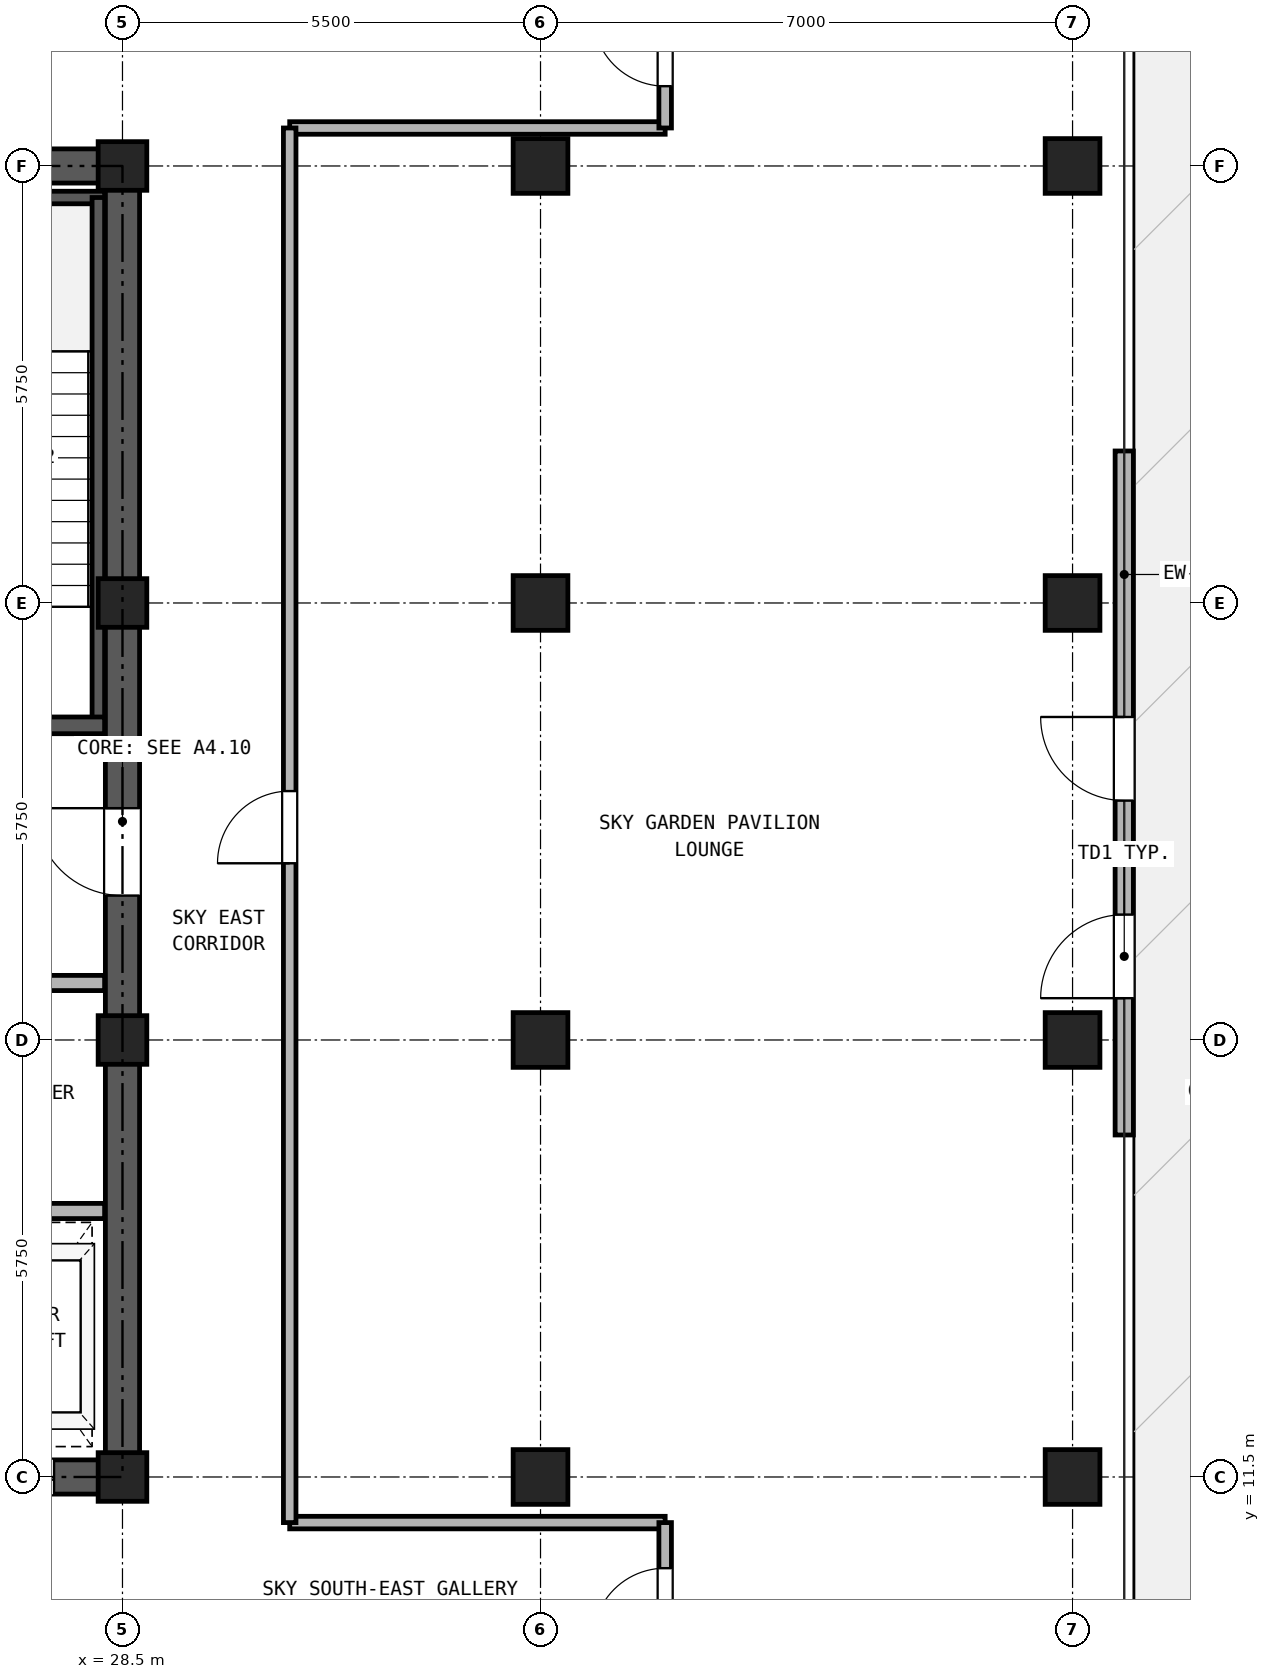
"""IFC4 building model, lengths in metres.
Left out: names, types, materials, properties, quantities, classifications, styles, units other than length and angle.
Written with IfcOpenShell. Run it as: python <this file> out.ifc"""

import sys

from ifc_helpers import new_model, si_unit, direction, frame, frame_2d, origin, origin_2d, place, context, subcontext, project, spatial, rectangle, hollow_rectangle, extrude, source, transform, mapped, element, fill, save


model = new_model("IFC4")
c1 = context("Model", 3, precision=1e-05, world=origin(), true_north=direction((0.0, 1.0)))
c2 = subcontext(c1, "Body", "Model", "MODEL_VIEW")
j1 = project(units=[si_unit("LENGTHUNIT", "METRE"), si_unit("PLANEANGLEUNIT", "RADIAN")], contexts=[c1])
p1 = place(None, origin())
s1 = spatial("IfcSite", under=j1, at=p1, CompositionType="ELEMENT")
p2 = place(p1, origin())
s2 = spatial("IfcBuilding", under=s1, at=p2, CompositionType="ELEMENT")
p3 = place(p2, frame((0.0, 0.0, 151.6)))
s3 = spatial("IfcBuildingStorey", under=s2, at=p3, CompositionType="ELEMENT", Elevation=151.6)
m1 = source(origin(), c2, "Body", "SweptSolid", [
    extrude(hollow_rectangle(XDim=0.72, YDim=0.72, WallThickness=0.04, at=origin_2d()), origin(), (0.0, 0.0, 1.0), 4.25),
])
for number, where, z_axis, x_axis in (
    (1, (41.0, 11.5, 0.0), (0.0, 0.0, 1.0), (1.0, 0.0, 0.0)),
    (2, (41.0, 17.25, 0.0), (0.0, 0.0, 1.0), (1.0, 0.0, 0.0)),
    (3, (41.0, 23.0, 0.0), (0.0, 0.0, 1.0), (1.0, 0.0, 0.0)),
    (4, (41.0, 28.75, 0.0), (0.0, 0.0, 1.0), (1.0, 0.0, 0.0)),
):
    element("IfcColumn", number, at=place(p3, frame(where, z_axis=z_axis, x_axis=x_axis)), inside=s3, PredefinedType="COLUMN", context=c2, shape_type="MappedRepresentation", body=[
        mapped(m1, transform((0.0, 0.0, 0.0), x_axis=(1.0, 0.0, 0.0), y_axis=(0.0, 1.0, 0.0), z_axis=(0.0, 0.0, 1.0), scale=1.0)),
    ])
m2 = source(origin(), c2, "Body", "SweptSolid", [
    extrude(hollow_rectangle(XDim=0.64, YDim=0.64, WallThickness=0.035, at=origin_2d()), origin(), (0.0, 0.0, 1.0), 4.25),
])
for number, where, z_axis, x_axis in (
    (5, (28.5, 11.5, 0.0), (0.0, 0.0, 1.0), (1.0, 0.0, 0.0)),
    (6, (28.5, 17.25, 0.0), (0.0, 0.0, 1.0), (1.0, 0.0, 0.0)),
    (7, (28.5, 23.0, 0.0), (0.0, 0.0, 1.0), (1.0, 0.0, 0.0)),
    (8, (28.5, 28.75, 0.0), (0.0, 0.0, 1.0), (1.0, 0.0, 0.0)),
):
    element("IfcColumn", number, at=place(p3, frame(where, z_axis=z_axis, x_axis=x_axis)), inside=s3, PredefinedType="COLUMN", context=c2, shape_type="MappedRepresentation", body=[
        mapped(m2, transform((0.0, 0.0, 0.0), x_axis=(1.0, 0.0, 0.0), y_axis=(0.0, 1.0, 0.0), z_axis=(0.0, 0.0, 1.0), scale=1.0)),
    ])
for number, where, z_axis, x_axis in (
    (9, (34.0, 11.5, 0.0), (0.0, 0.0, 1.0), (1.0, 0.0, 0.0)),
    (10, (34.0, 17.25, 0.0), (0.0, 0.0, 1.0), (1.0, 0.0, 0.0)),
    (11, (34.0, 23.0, 0.0), (0.0, 0.0, 1.0), (1.0, 0.0, 0.0)),
    (12, (34.0, 28.75, 0.0), (0.0, 0.0, 1.0), (1.0, 0.0, 0.0)),
):
    element("IfcColumn", number, at=place(p3, frame(where, z_axis=z_axis, x_axis=x_axis)), inside=s3, PredefinedType="COLUMN", context=c2, shape_type="MappedRepresentation", body=[
        mapped(m1, transform((0.0, 0.0, 0.0), x_axis=(1.0, 0.0, 0.0), y_axis=(0.0, 1.0, 0.0), z_axis=(0.0, 0.0, 1.0), scale=1.0)),
    ])
p4 = place(p3, frame((41.68, 16.0, 0.0), z_axis=(0.0, 0.0, 1.0), x_axis=(0.0, 1.0, 0.0)))
e13 = element("IfcWall", 13, at=p4, inside=s3, PredefinedType="SOLIDWALL", context=c2, shape_type="SweptSolid", body=[
    extrude(rectangle(XDim=9.0, YDim=0.24, at=frame_2d((4.5, 0.0))), origin(), (0.0, 0.0, 1.0), 4.25),
])
p5 = place(p4, frame((1.8, 0.0, 0.0)))
e14 = element("IfcOpeningElement", 14, at=p5, cuts=e13, PredefinedType="OPENING", context=c2, shape_type="SweptSolid", body=[
    extrude(rectangle(XDim=1.1, YDim=2.2, at=frame_2d((0.55, 1.1))), frame((0.0, 0.13, 0.0), z_axis=(0.0, -1.0, 0.0), x_axis=(1.0, 0.0, 0.0)), (0.0, 0.0, 1.0), 0.26),
])
p6 = place(p4, frame((4.4, 0.0, 0.0)))
e15 = element("IfcOpeningElement", 15, at=p6, cuts=e13, PredefinedType="OPENING", context=c2, shape_type="SweptSolid", body=[
    extrude(rectangle(XDim=1.1, YDim=2.2, at=frame_2d((0.55, 1.1))), frame((0.0, 0.13, 0.0), z_axis=(0.0, -1.0, 0.0), x_axis=(1.0, 0.0, 0.0)), (0.0, 0.0, 1.0), 0.26),
])
p7 = place(p3, frame((18.275, 11.5, 0.0), z_axis=(0.0, 0.0, 1.0), x_axis=(1.0, 0.0, 0.0)))
e16 = element("IfcWall", 16, at=p7, inside=s3, PredefinedType="SHEAR", context=c2, shape_type="SweptSolid", body=[
    extrude(rectangle(XDim=10.45, YDim=0.45, at=frame_2d((5.225, 0.0))), origin(), (0.0, 0.0, 1.0), 4.25),
])
p8 = place(p7, frame((2.325, 0.0, 0.0)))
e17 = element("IfcOpeningElement", 17, at=p8, cuts=e16, PredefinedType="OPENING", context=c2, shape_type="SweptSolid", body=[
    extrude(rectangle(XDim=0.95, YDim=2.15, at=frame_2d((0.475, 1.075))), frame((0.0, 0.235, 0.0), z_axis=(0.0, -1.0, 0.0), x_axis=(1.0, 0.0, 0.0)), (0.0, 0.0, 1.0), 0.47),
])
p9 = place(p7, frame((5.825, 0.0, 0.0)))
e18 = element("IfcOpeningElement", 18, at=p9, cuts=e16, PredefinedType="OPENING", context=c2, shape_type="SweptSolid", body=[
    extrude(rectangle(XDim=1.1, YDim=2.25, at=frame_2d((0.55, 1.125))), frame((0.0, 0.235, 0.0), z_axis=(0.0, -1.0, 0.0), x_axis=(1.0, 0.0, 0.0)), (0.0, 0.0, 1.0), 0.47),
])
p10 = place(p7, frame((8.225, 0.0, 0.0)))
e19 = element("IfcOpeningElement", 19, at=p10, cuts=e16, PredefinedType="OPENING", context=c2, shape_type="SweptSolid", body=[
    extrude(rectangle(XDim=1.1, YDim=2.25, at=frame_2d((0.55, 1.125))), frame((0.0, 0.235, 0.0), z_axis=(0.0, -1.0, 0.0), x_axis=(1.0, 0.0, 0.0)), (0.0, 0.0, 1.0), 0.47),
])
p11 = place(p3, frame((18.275, 28.75, 0.0), z_axis=(0.0, 0.0, 1.0), x_axis=(1.0, 0.0, 0.0)))
e20 = element("IfcWall", 20, at=p11, inside=s3, PredefinedType="SHEAR", context=c2, shape_type="SweptSolid", body=[
    extrude(rectangle(XDim=10.45, YDim=0.45, at=frame_2d((5.225, 0.0))), origin(), (0.0, 0.0, 1.0), 4.25),
])
p12 = place(p11, frame((4.105, 0.0, 0.0)))
e21 = element("IfcOpeningElement", 21, at=p12, cuts=e20, PredefinedType="OPENING", context=c2, shape_type="SweptSolid", body=[
    extrude(rectangle(XDim=0.9, YDim=2.05, at=frame_2d((0.45, 1.025))), frame((0.0, 0.235, 0.0), z_axis=(0.0, -1.0, 0.0), x_axis=(1.0, 0.0, 0.0)), (0.0, 0.0, 1.0), 0.47),
])
p13 = place(p11, frame((5.645, 0.0, 0.0)))
e22 = element("IfcOpeningElement", 22, at=p13, cuts=e20, PredefinedType="OPENING", context=c2, shape_type="SweptSolid", body=[
    extrude(rectangle(XDim=0.9, YDim=2.05, at=frame_2d((0.45, 1.025))), frame((0.0, 0.235, 0.0), z_axis=(0.0, -1.0, 0.0), x_axis=(1.0, 0.0, 0.0)), (0.0, 0.0, 1.0), 0.47),
])
p14 = place(p3, frame((28.5, 11.725, 0.0), z_axis=(0.0, 0.0, 1.0), x_axis=(0.0, 1.0, 0.0)))
e23 = element("IfcWall", 23, at=p14, inside=s3, PredefinedType="SHEAR", context=c2, shape_type="SweptSolid", body=[
    extrude(rectangle(XDim=16.8, YDim=0.45, at=frame_2d((8.4, 0.0))), origin(), (0.0, 0.0, 1.0), 4.25),
])
p15 = place(p14, frame((7.425, 0.0, 0.0)))
e24 = element("IfcOpeningElement", 24, at=p15, cuts=e23, PredefinedType="OPENING", context=c2, shape_type="SweptSolid", body=[
    extrude(rectangle(XDim=1.15, YDim=2.2, at=frame_2d((0.575, 1.1))), frame((0.0, 0.235, 0.0), z_axis=(0.0, -1.0, 0.0), x_axis=(1.0, 0.0, 0.0)), (0.0, 0.0, 1.0), 0.47),
])
p16 = place(p3, frame((25.13, 28.335, 0.0), z_axis=(0.0, 0.0, 1.0), x_axis=(1.0, 0.0, 0.0)))
e25 = element("IfcWall", 25, at=p16, inside=s3, PredefinedType="PARTITIONING", context=c2, shape_type="SweptSolid", body=[
    extrude(rectangle(XDim=3.135, YDim=0.165, at=frame_2d((1.567, 0.0))), origin(), (0.0, 0.0, 1.0), 4.25),
])
p17 = place(p3, frame((28.183, 21.39, 0.0), z_axis=(0.0, 0.0, 1.0), x_axis=(0.0, 1.0, 0.0)))
e26 = element("IfcWall", 26, at=p17, inside=s3, PredefinedType="PARTITIONING", context=c2, shape_type="SweptSolid", body=[
    extrude(rectangle(XDim=6.945, YDim=0.165, at=frame_2d((3.473, 0.0))), origin(), (0.0, 0.0, 1.0), 4.25),
])
p18 = place(p3, frame((25.13, 21.39, 0.0), z_axis=(0.0, 0.0, 1.0), x_axis=(1.0, 0.0, 0.0)))
e27 = element("IfcWall", 27, at=p18, inside=s3, PredefinedType="SOLIDWALL", context=c2, shape_type="SweptSolid", body=[
    extrude(rectangle(XDim=3.135, YDim=0.22, at=frame_2d((1.567, 0.0))), origin(), (0.0, 0.0, 1.0), 4.25),
])
p19 = place(p18, frame((0.92, 0.0, 0.0)))
e28 = element("IfcOpeningElement", 28, at=p19, cuts=e27, PredefinedType="OPENING", context=c2, shape_type="SweptSolid", body=[
    extrude(rectangle(XDim=1.15, YDim=2.2, at=frame_2d((0.575, 1.1))), frame((0.0, 0.12, 0.0), z_axis=(0.0, -1.0, 0.0), x_axis=(1.0, 0.0, 0.0)), (0.0, 0.0, 1.0), 0.24),
])
p20 = place(p3, frame((18.735, 18.0, 0.0), z_axis=(0.0, 0.0, 1.0), x_axis=(1.0, 0.0, 0.0)))
e29 = element("IfcWall", 29, at=p20, inside=s3, PredefinedType="PARTITIONING", context=c2, shape_type="SweptSolid", body=[
    extrude(rectangle(XDim=9.53, YDim=0.2, at=frame_2d((4.765, 0.0))), origin(), (0.0, 0.0, 1.0), 4.25),
])
p21 = place(p20, frame((0.515, 0.0, 0.0)))
e30 = element("IfcOpeningElement", 30, at=p21, cuts=e29, PredefinedType="OPENING", context=c2, shape_type="SweptSolid", body=[
    extrude(rectangle(XDim=1.3, YDim=2.3, at=frame_2d((0.65, 1.15))), frame((0.0, 0.11, 0.0), z_axis=(0.0, -1.0, 0.0), x_axis=(1.0, 0.0, 0.0)), (0.0, 0.0, 1.0), 0.22),
])
p22 = place(p20, frame((2.615, 0.0, 0.0)))
e31 = element("IfcOpeningElement", 31, at=p22, cuts=e29, PredefinedType="OPENING", context=c2, shape_type="SweptSolid", body=[
    extrude(rectangle(XDim=1.3, YDim=2.3, at=frame_2d((0.65, 1.15))), frame((0.0, 0.11, 0.0), z_axis=(0.0, -1.0, 0.0), x_axis=(1.0, 0.0, 0.0)), (0.0, 0.0, 1.0), 0.22),
])
p23 = place(p20, frame((5.015, 0.0, 0.0)))
e32 = element("IfcOpeningElement", 32, at=p23, cuts=e29, PredefinedType="OPENING", context=c2, shape_type="SweptSolid", body=[
    extrude(rectangle(XDim=0.9, YDim=2.05, at=frame_2d((0.45, 1.025))), frame((0.0, 0.11, 0.0), z_axis=(0.0, -1.0, 0.0), x_axis=(1.0, 0.0, 0.0)), (0.0, 0.0, 1.0), 0.22),
])
p24 = place(p20, frame((7.715, 0.0, 0.0)))
e33 = element("IfcOpeningElement", 33, at=p24, cuts=e29, PredefinedType="OPENING", context=c2, shape_type="SweptSolid", body=[
    extrude(rectangle(XDim=0.9, YDim=2.05, at=frame_2d((0.45, 1.025))), frame((0.0, 0.11, 0.0), z_axis=(0.0, -1.0, 0.0), x_axis=(1.0, 0.0, 0.0)), (0.0, 0.0, 1.0), 0.22),
])
p25 = place(p3, frame((18.735, 15.0, 0.0), z_axis=(0.0, 0.0, 1.0), x_axis=(1.0, 0.0, 0.0)))
e34 = element("IfcWall", 34, at=p25, inside=s3, PredefinedType="PARTITIONING", context=c2, shape_type="SweptSolid", body=[
    extrude(rectangle(XDim=9.53, YDim=0.2, at=frame_2d((4.765, 0.0))), origin(), (0.0, 0.0, 1.0), 4.25),
])
for number, where, z_axis, x_axis in (
    (35, (30.7, 10.9, 0.0), (0.0, 0.0, 1.0), (1.0, 0.0, 0.0)),
    (36, (30.7, 29.25, 0.0), (0.0, 0.0, 1.0), (1.0, 0.0, 0.0)),
):
    element("IfcWall", number, at=place(p3, frame(where, z_axis=z_axis, x_axis=x_axis)), inside=s3, PredefinedType="PARTITIONING", context=c2, shape_type="SweptSolid", body=[
        extrude(rectangle(XDim=4.94, YDim=0.165, at=frame_2d((2.47, 0.0))), origin(), (0.0, 0.0, 1.0), 4.25),
    ])
p26 = place(p3, frame((30.7, 10.9, 0.0), z_axis=(0.0, 0.0, 1.0), x_axis=(0.0, 1.0, 0.0)))
e37 = element("IfcWall", 37, at=p26, inside=s3, PredefinedType="PARTITIONING", context=c2, shape_type="SweptSolid", body=[
    extrude(rectangle(XDim=18.35, YDim=0.165, at=frame_2d((9.175, 0.0))), origin(), (0.0, 0.0, 1.0), 4.25),
])
p27 = place(p26, frame((8.675, 0.0, 0.0)))
e38 = element("IfcOpeningElement", 38, at=p27, cuts=e37, PredefinedType="OPENING", context=c2, shape_type="SweptSolid", body=[
    extrude(rectangle(XDim=0.95, YDim=2.15, at=frame_2d((0.475, 1.075))), frame((0.0, 0.093, 0.0), z_axis=(0.0, -1.0, 0.0), x_axis=(1.0, 0.0, 0.0)), (0.0, 0.0, 1.0), 0.185),
])
p28 = place(p3, frame((35.64, 0.16, 0.0), z_axis=(0.0, 0.0, 1.0), x_axis=(0.0, 1.0, 0.0)))
e39 = element("IfcWall", 39, at=p28, inside=s3, PredefinedType="PARTITIONING", context=c2, shape_type="SweptSolid", body=[
    extrude(rectangle(XDim=10.74, YDim=0.165, at=frame_2d((5.37, 0.0))), origin(), (0.0, 0.0, 1.0), 4.25),
])
p29 = place(p28, frame((9.19, 0.0, 0.0)))
e40 = element("IfcOpeningElement", 40, at=p29, cuts=e39, PredefinedType="OPENING", context=c2, shape_type="SweptSolid", body=[
    extrude(rectangle(XDim=0.95, YDim=2.15, at=frame_2d((0.475, 1.075))), frame((0.0, 0.093, 0.0), z_axis=(0.0, -1.0, 0.0), x_axis=(1.0, 0.0, 0.0)), (0.0, 0.0, 1.0), 0.185),
])
p30 = place(p3, frame((35.64, 29.25, 0.0), z_axis=(0.0, 0.0, 1.0), x_axis=(0.0, 1.0, 0.0)))
e41 = element("IfcWall", 41, at=p30, inside=s3, PredefinedType="PARTITIONING", context=c2, shape_type="SweptSolid", body=[
    extrude(rectangle(XDim=5.89, YDim=0.165, at=frame_2d((2.945, 0.0))), origin(), (0.0, 0.0, 1.0), 4.25),
])
p31 = place(p30, frame((0.55, 0.0, 0.0)))
e42 = element("IfcOpeningElement", 42, at=p31, cuts=e41, PredefinedType="OPENING", context=c2, shape_type="SweptSolid", body=[
    extrude(rectangle(XDim=0.95, YDim=2.15, at=frame_2d((0.475, 1.075))), frame((0.0, 0.093, 0.0), z_axis=(0.0, -1.0, 0.0), x_axis=(1.0, 0.0, 0.0)), (0.0, 0.0, 1.0), 0.185),
])
p32 = place(p5, frame((1.1, 0.0, 0.0), z_axis=(0.0, 0.0, 1.0), x_axis=(-1.0, 0.0, 0.0)))
e43 = element("IfcDoor", 43, at=p32, inside=s3, OperationType="SINGLE_SWING_LEFT", PredefinedType="DOOR", context=c2, shape_type="SweptSolid", body=[
    extrude(rectangle(XDim=1.1, YDim=2.2, at=frame_2d((0.55, 1.1))), frame((0.0, 0.025, 0.0), z_axis=(0.0, -1.0, 0.0), x_axis=(1.0, 0.0, 0.0)), (0.0, 0.0, 1.0), 0.05),
])
fill(e14, e43)
p33 = place(p6, frame((1.1, 0.0, 0.0), z_axis=(0.0, 0.0, 1.0), x_axis=(-1.0, 0.0, 0.0)))
e44 = element("IfcDoor", 44, at=p33, inside=s3, OperationType="SINGLE_SWING_RIGHT", PredefinedType="DOOR", context=c2, shape_type="SweptSolid", body=[
    extrude(rectangle(XDim=1.1, YDim=2.2, at=frame_2d((0.55, 1.1))), frame((0.0, 0.025, 0.0), z_axis=(0.0, -1.0, 0.0), x_axis=(1.0, 0.0, 0.0)), (0.0, 0.0, 1.0), 0.05),
])
fill(e15, e44)
p34 = place(p15, origin())
e45 = element("IfcDoor", 45, at=p34, inside=s3, OperationType="SINGLE_SWING_RIGHT", PredefinedType="DOOR", context=c2, shape_type="SweptSolid", body=[
    extrude(rectangle(XDim=1.15, YDim=2.2, at=frame_2d((0.575, 1.1))), frame((0.0, 0.025, 0.0), z_axis=(0.0, -1.0, 0.0), x_axis=(1.0, 0.0, 0.0)), (0.0, 0.0, 1.0), 0.05),
])
fill(e24, e45)
p35 = place(p10, frame((1.1, 0.0, 0.0), z_axis=(0.0, 0.0, 1.0), x_axis=(-1.0, 0.0, 0.0)))
e46 = element("IfcDoor", 46, at=p35, inside=s3, OperationType="DOUBLE_DOOR_SLIDING", PredefinedType="DOOR", context=c2, shape_type="SweptSolid", body=[
    extrude(rectangle(XDim=1.1, YDim=2.25, at=frame_2d((0.55, 1.125))), frame((0.0, 0.025, 0.0), z_axis=(0.0, -1.0, 0.0), x_axis=(1.0, 0.0, 0.0)), (0.0, 0.0, 1.0), 0.05),
])
fill(e19, e46)
p36 = place(p29, origin())
e47 = element("IfcDoor", 47, at=p36, inside=s3, OperationType="SINGLE_SWING_LEFT", PredefinedType="DOOR", context=c2, shape_type="SweptSolid", body=[
    extrude(rectangle(XDim=0.95, YDim=2.15, at=frame_2d((0.475, 1.075))), frame((0.0, 0.025, 0.0), z_axis=(0.0, -1.0, 0.0), x_axis=(1.0, 0.0, 0.0)), (0.0, 0.0, 1.0), 0.05),
])
fill(e40, e47)
p37 = place(p31, origin())
e48 = element("IfcDoor", 48, at=p37, inside=s3, OperationType="SINGLE_SWING_RIGHT", PredefinedType="DOOR", context=c2, shape_type="SweptSolid", body=[
    extrude(rectangle(XDim=0.95, YDim=2.15, at=frame_2d((0.475, 1.075))), frame((0.0, 0.025, 0.0), z_axis=(0.0, -1.0, 0.0), x_axis=(1.0, 0.0, 0.0)), (0.0, 0.0, 1.0), 0.05),
])
fill(e42, e48)
p38 = place(p27, origin())
e49 = element("IfcDoor", 49, at=p38, inside=s3, OperationType="SINGLE_SWING_LEFT", PredefinedType="DOOR", context=c2, shape_type="SweptSolid", body=[
    extrude(rectangle(XDim=0.95, YDim=2.15, at=frame_2d((0.475, 1.075))), frame((0.0, 0.025, 0.0), z_axis=(0.0, -1.0, 0.0), x_axis=(1.0, 0.0, 0.0)), (0.0, 0.0, 1.0), 0.05),
])
fill(e38, e49)
save(model, sys.argv[1])
